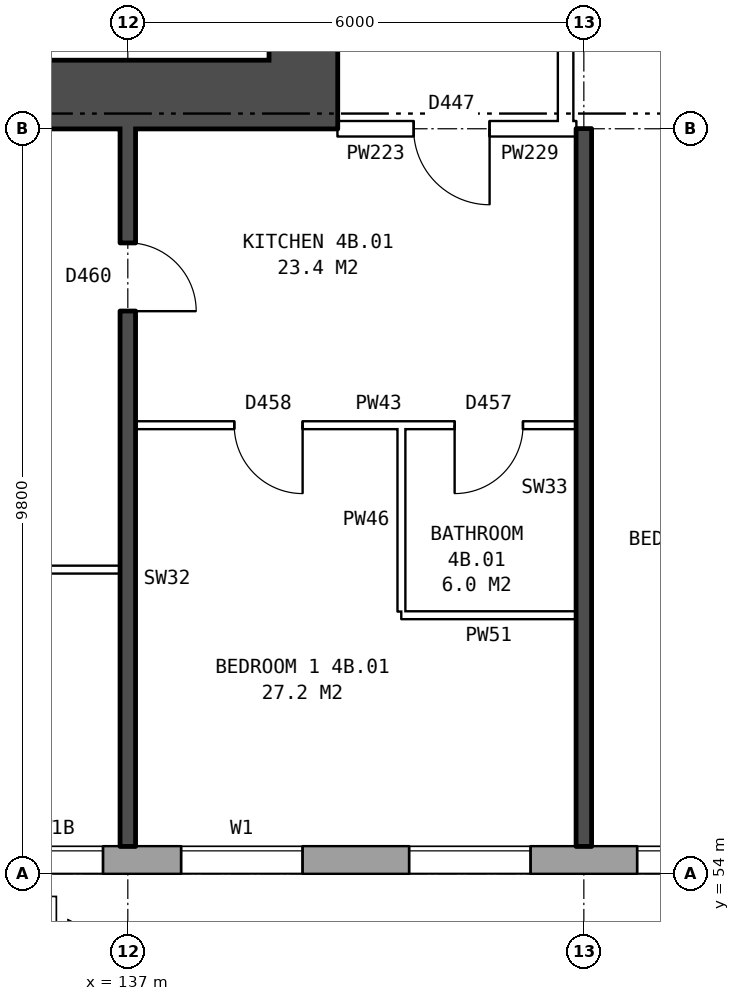
"""IFC4 building model, lengths in metres.
Left out: names, types, materials, properties, quantities, classifications, styles, units other than length and angle.
Written with IfcOpenShell. Run it as: python <this file> out.ifc"""

import sys

from ifc_helpers import new_model, si_unit, direction, frame, frame_2d, origin, place, context, subcontext, project, spatial, rectangle, extrude, element, fill, save


model = new_model("IFC4")
c1 = context("Model", 3, precision=1e-05, world=origin(), true_north=direction((0.0, 1.0)))
c2 = subcontext(c1, "Body", "Model", "MODEL_VIEW")
j1 = project(units=[si_unit("LENGTHUNIT", "METRE"), si_unit("PLANEANGLEUNIT", "RADIAN")], contexts=[c1])
p1 = place(None, origin())
s1 = spatial("IfcSite", under=j1, at=p1, CompositionType="ELEMENT")
p2 = place(p1, origin())
s2 = spatial("IfcBuilding", under=s1, at=p2, CompositionType="ELEMENT")
p3 = place(p2, frame((0.0, 0.0, 19.5)))
s3 = spatial("IfcBuildingStorey", under=s2, at=p3, CompositionType="ELEMENT", Elevation=19.5)
p4 = place(p3, frame((134.075, 54.18, 0.0), z_axis=(0.0, 0.0, 1.0), x_axis=(1.0, 0.0, 0.0)))
e1 = element("IfcWall", 1, at=p4, inside=s3, PredefinedType="STANDARD", context=c2, shape_type="SweptSolid", body=[
    extrude(rectangle(XDim=40.601, YDim=0.36, at=frame_2d((20.3, 0.0))), origin(), (0.0, 0.0, 1.0), 2.85),
])
p5 = place(p4, frame((0.3, 0.0, 0.8)))
e2 = element("IfcOpeningElement", 2, at=p5, cuts=e1, PredefinedType="OPENING", context=c2, shape_type="SweptSolid", body=[
    extrude(rectangle(XDim=0.8, YDim=0.9, at=frame_2d((0.4, 0.45))), frame((0.0, 0.19, 0.0), z_axis=(0.0, -1.0, 0.0), x_axis=(1.0, 0.0, 0.0)), (0.0, 0.0, 1.0), 0.38),
])
p6 = place(p4, frame((3.625, 0.0, 0.8)))
e3 = element("IfcOpeningElement", 3, at=p6, cuts=e1, PredefinedType="OPENING", context=c2, shape_type="SweptSolid", body=[
    extrude(rectangle(XDim=1.6, YDim=1.8, at=frame_2d((0.8, 0.9))), frame((0.0, 0.19, 0.0), z_axis=(0.0, -1.0, 0.0), x_axis=(1.0, 0.0, 0.0)), (0.0, 0.0, 1.0), 0.38),
])
p7 = place(p4, frame((6.625, 0.0, 0.8)))
e4 = element("IfcOpeningElement", 4, at=p7, cuts=e1, PredefinedType="OPENING", context=c2, shape_type="SweptSolid", body=[
    extrude(rectangle(XDim=1.6, YDim=1.8, at=frame_2d((0.8, 0.9))), frame((0.0, 0.19, 0.0), z_axis=(0.0, -1.0, 0.0), x_axis=(1.0, 0.0, 0.0)), (0.0, 0.0, 1.0), 0.38),
])
p8 = place(p4, frame((9.625, 0.0, 0.8)))
e5 = element("IfcOpeningElement", 5, at=p8, cuts=e1, PredefinedType="OPENING", context=c2, shape_type="SweptSolid", body=[
    extrude(rectangle(XDim=1.6, YDim=1.8, at=frame_2d((0.8, 0.9))), frame((0.0, 0.19, 0.0), z_axis=(0.0, -1.0, 0.0), x_axis=(1.0, 0.0, 0.0)), (0.0, 0.0, 1.0), 0.38),
])
p9 = place(p4, frame((12.625, 0.0, 0.8)))
e6 = element("IfcOpeningElement", 6, at=p9, cuts=e1, PredefinedType="OPENING", context=c2, shape_type="SweptSolid", body=[
    extrude(rectangle(XDim=1.6, YDim=1.8, at=frame_2d((0.8, 0.9))), frame((0.0, 0.19, 0.0), z_axis=(0.0, -1.0, 0.0), x_axis=(1.0, 0.0, 0.0)), (0.0, 0.0, 1.0), 0.38),
])
p10 = place(p4, frame((15.625, 0.0, 0.8)))
e7 = element("IfcOpeningElement", 7, at=p10, cuts=e1, PredefinedType="OPENING", context=c2, shape_type="SweptSolid", body=[
    extrude(rectangle(XDim=1.6, YDim=1.8, at=frame_2d((0.8, 0.9))), frame((0.0, 0.19, 0.0), z_axis=(0.0, -1.0, 0.0), x_axis=(1.0, 0.0, 0.0)), (0.0, 0.0, 1.0), 0.38),
])
p11 = place(p4, frame((18.625, 0.0, 0.8)))
e8 = element("IfcOpeningElement", 8, at=p11, cuts=e1, PredefinedType="OPENING", context=c2, shape_type="SweptSolid", body=[
    extrude(rectangle(XDim=1.6, YDim=1.8, at=frame_2d((0.8, 0.9))), frame((0.0, 0.19, 0.0), z_axis=(0.0, -1.0, 0.0), x_axis=(1.0, 0.0, 0.0)), (0.0, 0.0, 1.0), 0.38),
])
p12 = place(p4, frame((21.625, 0.0, 0.8)))
e9 = element("IfcOpeningElement", 9, at=p12, cuts=e1, PredefinedType="OPENING", context=c2, shape_type="SweptSolid", body=[
    extrude(rectangle(XDim=1.6, YDim=1.8, at=frame_2d((0.8, 0.9))), frame((0.0, 0.19, 0.0), z_axis=(0.0, -1.0, 0.0), x_axis=(1.0, 0.0, 0.0)), (0.0, 0.0, 1.0), 0.38),
])
p13 = place(p4, frame((24.625, 0.0, 0.8)))
e10 = element("IfcOpeningElement", 10, at=p13, cuts=e1, PredefinedType="OPENING", context=c2, shape_type="SweptSolid", body=[
    extrude(rectangle(XDim=1.6, YDim=1.8, at=frame_2d((0.8, 0.9))), frame((0.0, 0.19, 0.0), z_axis=(0.0, -1.0, 0.0), x_axis=(1.0, 0.0, 0.0)), (0.0, 0.0, 1.0), 0.38),
])
p14 = place(p4, frame((27.625, 0.0, 0.8)))
e11 = element("IfcOpeningElement", 11, at=p14, cuts=e1, PredefinedType="OPENING", context=c2, shape_type="SweptSolid", body=[
    extrude(rectangle(XDim=1.6, YDim=1.8, at=frame_2d((0.8, 0.9))), frame((0.0, 0.19, 0.0), z_axis=(0.0, -1.0, 0.0), x_axis=(1.0, 0.0, 0.0)), (0.0, 0.0, 1.0), 0.38),
])
p15 = place(p4, frame((30.625, 0.0, 0.8)))
e12 = element("IfcOpeningElement", 12, at=p15, cuts=e1, PredefinedType="OPENING", context=c2, shape_type="SweptSolid", body=[
    extrude(rectangle(XDim=1.6, YDim=1.8, at=frame_2d((0.8, 0.9))), frame((0.0, 0.19, 0.0), z_axis=(0.0, -1.0, 0.0), x_axis=(1.0, 0.0, 0.0)), (0.0, 0.0, 1.0), 0.38),
])
p16 = place(p4, frame((33.625, 0.0, 0.8)))
e13 = element("IfcOpeningElement", 13, at=p16, cuts=e1, PredefinedType="OPENING", context=c2, shape_type="SweptSolid", body=[
    extrude(rectangle(XDim=1.6, YDim=1.8, at=frame_2d((0.8, 0.9))), frame((0.0, 0.19, 0.0), z_axis=(0.0, -1.0, 0.0), x_axis=(1.0, 0.0, 0.0)), (0.0, 0.0, 1.0), 0.38),
])
p17 = place(p4, frame((36.625, 0.0, 0.8)))
e14 = element("IfcOpeningElement", 14, at=p17, cuts=e1, PredefinedType="OPENING", context=c2, shape_type="SweptSolid", body=[
    extrude(rectangle(XDim=1.6, YDim=1.8, at=frame_2d((0.8, 0.9))), frame((0.0, 0.19, 0.0), z_axis=(0.0, -1.0, 0.0), x_axis=(1.0, 0.0, 0.0)), (0.0, 0.0, 1.0), 0.38),
])
p18 = place(p4, frame((1.4, 0.0, 0.8)))
e15 = element("IfcOpeningElement", 15, at=p18, cuts=e1, PredefinedType="OPENING", context=c2, shape_type="SweptSolid", body=[
    extrude(rectangle(XDim=1.2, YDim=1.8, at=frame_2d((0.6, 0.9))), frame((0.0, 0.19, 0.0), z_axis=(0.0, -1.0, 0.0), x_axis=(1.0, 0.0, 0.0)), (0.0, 0.0, 1.0), 0.38),
])
p19 = place(p3, frame((139.31, 64.7, 0.0), z_axis=(0.0, 0.0, 1.0), x_axis=(0.0, 1.0, 0.0)))
e16 = element("IfcWall", 16, at=p19, inside=s3, PredefinedType="SHEAR", context=c2, shape_type="SweptSolid", body=[
    extrude(rectangle(XDim=10.6, YDim=0.9, at=frame_2d((5.3, 0.0))), origin(), (0.0, 0.0, 1.0), 2.85),
])
p20 = place(p19, frame((0.425, 0.0, 0.0)))
e17 = element("IfcOpeningElement", 17, at=p20, cuts=e16, PredefinedType="OPENING", context=c2, shape_type="SweptSolid", body=[
    extrude(rectangle(XDim=1.1, YDim=2.1, at=frame_2d((0.55, 1.05))), frame((0.0, 0.46, 0.0), z_axis=(0.0, -1.0, 0.0), x_axis=(1.0, 0.0, 0.0)), (0.0, 0.0, 1.0), 0.92),
])
p21 = place(p19, frame((9.0, 0.0, 0.0)))
e18 = element("IfcOpeningElement", 18, at=p21, cuts=e16, PredefinedType="OPENING", context=c2, shape_type="SweptSolid", body=[
    extrude(rectangle(XDim=1.1, YDim=2.1, at=frame_2d((0.55, 1.05))), frame((0.0, 0.46, 0.0), z_axis=(0.0, -1.0, 0.0), x_axis=(1.0, 0.0, 0.0)), (0.0, 0.0, 1.0), 0.92),
])
p22 = place(p19, frame((7.225, 0.0, 0.0)))
e19 = element("IfcOpeningElement", 19, at=p22, cuts=e16, PredefinedType="OPENING", context=c2, shape_type="SweptSolid", body=[
    extrude(rectangle(XDim=0.85, YDim=2.1, at=frame_2d((0.425, 1.05))), frame((0.0, 0.46, 0.0), z_axis=(0.0, -1.0, 0.0), x_axis=(1.0, 0.0, 0.0)), (0.0, 0.0, 1.0), 0.92),
])
p23 = place(p3, frame((139.76, 64.25, 0.0), z_axis=(0.0, 0.0, 1.0), x_axis=(-1.0, 0.0, 0.0)))
e20 = element("IfcWall", 20, at=p23, inside=s3, PredefinedType="SHEAR", context=c2, shape_type="SweptSolid", body=[
    extrude(rectangle(XDim=8.4, YDim=0.9, at=frame_2d((4.2, 0.0))), origin(), (0.0, 0.0, 1.0), 2.85),
])
p24 = place(p3, frame((142.76, 63.9, 0.0), z_axis=(0.0, 0.0, 1.0), x_axis=(0.0, 1.0, 0.0)))
e21 = element("IfcWall", 21, at=p24, inside=s3, PredefinedType="PARTITIONING", context=c2, shape_type="SweptSolid", body=[
    extrude(rectangle(XDim=12.2, YDim=0.2, at=frame_2d((6.1, 0.0))), origin(), (0.0, 0.0, 1.0), 2.85),
])
p25 = place(p24, frame((5.1, 0.0, 0.0)))
e22 = element("IfcOpeningElement", 22, at=p25, cuts=e21, PredefinedType="OPENING", context=c2, shape_type="SweptSolid", body=[
    extrude(rectangle(XDim=2.0, YDim=2.1, at=frame_2d((1.0, 1.05))), frame((0.0, 0.11, 0.0), z_axis=(0.0, -1.0, 0.0), x_axis=(1.0, 0.0, 0.0)), (0.0, 0.0, 1.0), 0.22),
])
p26 = place(p3, frame((140.6, 57.4, 0.0), z_axis=(0.0, 0.0, 1.0), x_axis=(1.0, 0.0, 0.0)))
e23 = element("IfcWall", 23, at=p26, inside=s3, PredefinedType="PARTITIONING", context=c2, shape_type="SweptSolid", body=[
    extrude(rectangle(XDim=2.3, YDim=0.1, at=frame_2d((1.15, 0.0))), origin(), (0.0, 0.0, 1.0), 2.85),
])
p27 = place(p3, frame((131.36, 58.0, 0.0), z_axis=(0.0, 0.0, 1.0), x_axis=(1.0, 0.0, 0.0)))
e24 = element("IfcWall", 24, at=p27, inside=s3, PredefinedType="PARTITIONING", context=c2, shape_type="SweptSolid", body=[
    extrude(rectangle(XDim=5.54, YDim=0.1, at=frame_2d((2.77, 0.0))), origin(), (0.0, 0.0, 1.0), 2.85),
])
p28 = place(p27, frame((2.32, 0.0, 0.0)))
e25 = element("IfcOpeningElement", 25, at=p28, cuts=e24, PredefinedType="OPENING", context=c2, shape_type="SweptSolid", body=[
    extrude(rectangle(XDim=0.9, YDim=2.1, at=frame_2d((0.45, 1.05))), frame((0.0, 0.06, 0.0), z_axis=(0.0, -1.0, 0.0), x_axis=(1.0, 0.0, 0.0)), (0.0, 0.0, 1.0), 0.12),
])
p29 = place(p3, frame((137.1, 59.9, 0.0), z_axis=(0.0, 0.0, 1.0), x_axis=(1.0, 0.0, 0.0)))
e26 = element("IfcWall", 26, at=p29, inside=s3, PredefinedType="PARTITIONING", context=c2, shape_type="SweptSolid", body=[
    extrude(rectangle(XDim=5.8, YDim=0.1, at=frame_2d((2.9, 0.0))), origin(), (0.0, 0.0, 1.0), 2.85),
])
p30 = place(p29, frame((1.3, 0.0, 0.0)))
e27 = element("IfcOpeningElement", 27, at=p30, cuts=e26, PredefinedType="OPENING", context=c2, shape_type="SweptSolid", body=[
    extrude(rectangle(XDim=0.9, YDim=2.1, at=frame_2d((0.45, 1.05))), frame((0.0, 0.06, 0.0), z_axis=(0.0, -1.0, 0.0), x_axis=(1.0, 0.0, 0.0)), (0.0, 0.0, 1.0), 0.12),
])
p31 = place(p29, frame((4.2, 0.0, 0.0)))
e28 = element("IfcOpeningElement", 28, at=p31, cuts=e26, PredefinedType="OPENING", context=c2, shape_type="SweptSolid", body=[
    extrude(rectangle(XDim=0.9, YDim=2.1, at=frame_2d((0.45, 1.05))), frame((0.0, 0.06, 0.0), z_axis=(0.0, -1.0, 0.0), x_axis=(1.0, 0.0, 0.0)), (0.0, 0.0, 1.0), 0.12),
])
p32 = place(p3, frame((139.76, 63.8, 0.0), z_axis=(0.0, 0.0, 1.0), x_axis=(1.0, 0.0, 0.0)))
e29 = element("IfcWall", 29, at=p32, inside=s3, PredefinedType="PARTITIONING", context=c2, shape_type="SweptSolid", body=[
    extrude(rectangle(XDim=3.0, YDim=0.2, at=frame_2d((1.5, 0.0))), origin(), (0.0, 0.0, 1.0), 2.85),
])
p33 = place(p32, frame((1.0, 0.0, 0.0)))
e30 = element("IfcOpeningElement", 30, at=p33, cuts=e29, PredefinedType="OPENING", context=c2, shape_type="SweptSolid", body=[
    extrude(rectangle(XDim=1.0, YDim=2.1, at=frame_2d((0.5, 1.05))), frame((0.0, 0.11, 0.0), z_axis=(0.0, -1.0, 0.0), x_axis=(1.0, 0.0, 0.0)), (0.0, 0.0, 1.0), 0.22),
])
p34 = place(p3, frame((142.76, 63.8, 0.0), z_axis=(0.0, 0.0, 1.0), x_axis=(1.0, 0.0, 0.0)))
e31 = element("IfcWall", 31, at=p34, inside=s3, PredefinedType="PARTITIONING", context=c2, shape_type="SweptSolid", body=[
    extrude(rectangle(XDim=0.14, YDim=0.2, at=frame_2d((0.07, 0.0))), origin(), (0.0, 0.0, 1.0), 2.85),
])
p35 = place(p3, frame((137.0, 54.36, 0.0), z_axis=(0.0, 0.0, 1.0), x_axis=(0.0, 1.0, 0.0)))
e32 = element("IfcWall", 32, at=p35, inside=s3, PredefinedType="SOLIDWALL", context=c2, shape_type="SweptSolid", body=[
    extrude(rectangle(XDim=9.44, YDim=0.2, at=frame_2d((4.72, 0.0))), origin(), (0.0, 0.0, 1.0), 2.85),
])
p36 = place(p35, frame((7.04, 0.0, 0.0)))
e33 = element("IfcOpeningElement", 33, at=p36, cuts=e32, PredefinedType="OPENING", context=c2, shape_type="SweptSolid", body=[
    extrude(rectangle(XDim=0.9, YDim=2.1, at=frame_2d((0.45, 1.05))), frame((0.0, 0.11, 0.0), z_axis=(0.0, -1.0, 0.0), x_axis=(1.0, 0.0, 0.0)), (0.0, 0.0, 1.0), 0.22),
])
p37 = place(p3, frame((140.6, 57.45, 0.0), z_axis=(0.0, 0.0, 1.0), x_axis=(0.0, 1.0, 0.0)))
e34 = element("IfcWall", 34, at=p37, inside=s3, PredefinedType="PARTITIONING", context=c2, shape_type="SweptSolid", body=[
    extrude(rectangle(XDim=2.4, YDim=0.1, at=frame_2d((1.2, 0.0))), origin(), (0.0, 0.0, 1.0), 2.85),
])
p38 = place(p3, frame((143.0, 54.36, 0.0), z_axis=(0.0, 0.0, 1.0), x_axis=(0.0, 1.0, 0.0)))
e35 = element("IfcWall", 35, at=p38, inside=s3, PredefinedType="SOLIDWALL", context=c2, shape_type="SweptSolid", body=[
    extrude(rectangle(XDim=9.44, YDim=0.2, at=frame_2d((4.72, 0.0))), origin(), (0.0, 0.0, 1.0), 2.85),
])
p39 = place(p6, origin())
e36 = element("IfcWindow", 36, at=p39, inside=s3, PartitioningType="SINGLE_PANEL", PredefinedType="WINDOW", context=c2, shape_type="SweptSolid", body=[
    extrude(rectangle(XDim=1.6, YDim=1.8, at=frame_2d((0.8, 0.9))), frame((0.0, 0.15, 0.0), z_axis=(0.0, -1.0, 0.0), x_axis=(1.0, 0.0, 0.0)), (0.0, 0.0, 1.0), 0.06),
])
fill(e3, e36)
p40 = place(p7, origin())
e37 = element("IfcWindow", 37, at=p40, inside=s3, PartitioningType="SINGLE_PANEL", PredefinedType="WINDOW", context=c2, shape_type="SweptSolid", body=[
    extrude(rectangle(XDim=1.6, YDim=1.8, at=frame_2d((0.8, 0.9))), frame((0.0, 0.15, 0.0), z_axis=(0.0, -1.0, 0.0), x_axis=(1.0, 0.0, 0.0)), (0.0, 0.0, 1.0), 0.06),
])
fill(e4, e37)
p41 = place(p8, origin())
e38 = element("IfcWindow", 38, at=p41, inside=s3, PartitioningType="SINGLE_PANEL", PredefinedType="WINDOW", context=c2, shape_type="SweptSolid", body=[
    extrude(rectangle(XDim=1.6, YDim=1.8, at=frame_2d((0.8, 0.9))), frame((0.0, 0.15, 0.0), z_axis=(0.0, -1.0, 0.0), x_axis=(1.0, 0.0, 0.0)), (0.0, 0.0, 1.0), 0.06),
])
fill(e5, e38)
p42 = place(p30, frame((0.9, 0.0, 0.0), z_axis=(0.0, 0.0, 1.0), x_axis=(-1.0, 0.0, 0.0)))
e39 = element("IfcDoor", 39, at=p42, inside=s3, OperationType="SINGLE_SWING_LEFT", PredefinedType="DOOR", context=c2, shape_type="SweptSolid", body=[
    extrude(rectangle(XDim=0.9, YDim=2.1, at=frame_2d((0.45, 1.05))), frame((0.0, 0.025, 0.0), z_axis=(0.0, -1.0, 0.0), x_axis=(1.0, 0.0, 0.0)), (0.0, 0.0, 1.0), 0.05),
])
fill(e27, e39)
p43 = place(p33, frame((1.0, 0.0, 0.0), z_axis=(0.0, 0.0, 1.0), x_axis=(-1.0, 0.0, 0.0)))
e40 = element("IfcDoor", 40, at=p43, inside=s3, OperationType="SINGLE_SWING_LEFT", PredefinedType="DOOR", context=c2, shape_type="SweptSolid", body=[
    extrude(rectangle(XDim=1.0, YDim=2.1, at=frame_2d((0.5, 1.05))), frame((0.0, 0.025, 0.0), z_axis=(0.0, -1.0, 0.0), x_axis=(1.0, 0.0, 0.0)), (0.0, 0.0, 1.0), 0.05),
])
fill(e30, e40)
p44 = place(p36, frame((0.9, 0.0, 0.0), z_axis=(0.0, 0.0, 1.0), x_axis=(-1.0, 0.0, 0.0)))
e41 = element("IfcDoor", 41, at=p44, inside=s3, OperationType="SINGLE_SWING_RIGHT", PredefinedType="DOOR", context=c2, shape_type="SweptSolid", body=[
    extrude(rectangle(XDim=0.9, YDim=2.1, at=frame_2d((0.45, 1.05))), frame((0.0, 0.025, 0.0), z_axis=(0.0, -1.0, 0.0), x_axis=(1.0, 0.0, 0.0)), (0.0, 0.0, 1.0), 0.05),
])
fill(e33, e41)
p45 = place(p31, frame((0.9, 0.0, 0.0), z_axis=(0.0, 0.0, 1.0), x_axis=(-1.0, 0.0, 0.0)))
e42 = element("IfcDoor", 42, at=p45, inside=s3, OperationType="SINGLE_SWING_RIGHT", PredefinedType="DOOR", context=c2, shape_type="SweptSolid", body=[
    extrude(rectangle(XDim=0.9, YDim=2.1, at=frame_2d((0.45, 1.05))), frame((0.0, 0.025, 0.0), z_axis=(0.0, -1.0, 0.0), x_axis=(1.0, 0.0, 0.0)), (0.0, 0.0, 1.0), 0.05),
])
fill(e28, e42)
p46 = place(p18, origin())
e43 = element("IfcWindow", 43, at=p46, inside=s3, PartitioningType="SINGLE_PANEL", PredefinedType="WINDOW", context=c2, shape_type="SweptSolid", body=[
    extrude(rectangle(XDim=1.2, YDim=1.8, at=frame_2d((0.6, 0.9))), frame((0.0, 0.15, 0.0), z_axis=(0.0, -1.0, 0.0), x_axis=(1.0, 0.0, 0.0)), (0.0, 0.0, 1.0), 0.06),
])
fill(e15, e43)
save(model, sys.argv[1])
